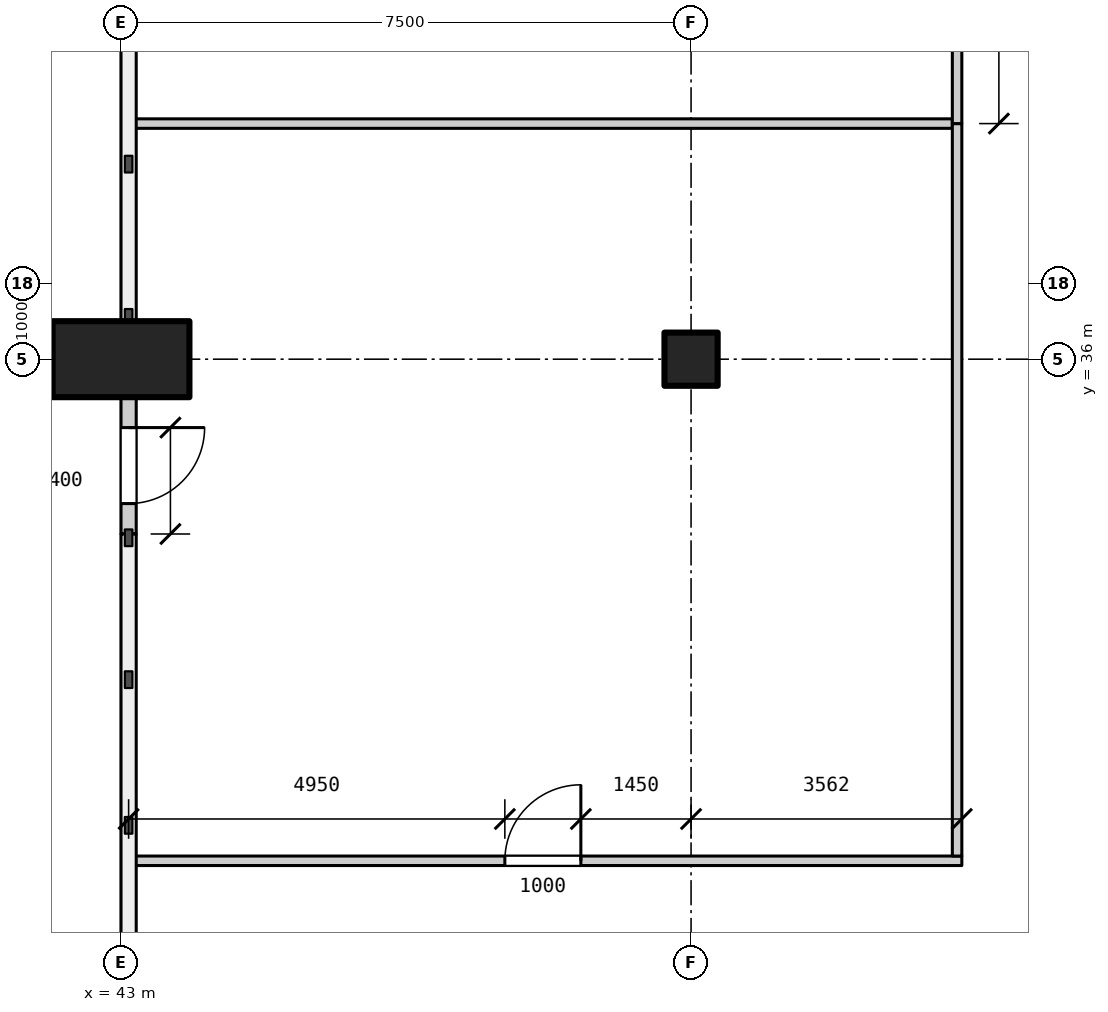
"""IFC4 building model, lengths in metres.
Left out: names, types, materials, properties, quantities, classifications, styles, units other than length and angle.
Written with IfcOpenShell. Run it as: python <this file> out.ifc"""

import sys

from ifc_helpers import new_model, si_unit, direction, frame, frame_2d, origin, origin_2d, place, context, subcontext, project, spatial, rectangle, extrude, element, fill, save


model = new_model("IFC4")
c1 = context("Model", 3, precision=1e-05, world=origin(), true_north=direction((0.0, 1.0)))
c2 = subcontext(c1, "Body", "Model", "MODEL_VIEW")
j1 = project(units=[si_unit("LENGTHUNIT", "METRE"), si_unit("PLANEANGLEUNIT", "RADIAN")], contexts=[c1])
p1 = place(None, origin())
s1 = spatial("IfcSite", under=j1, at=p1, CompositionType="ELEMENT")
p2 = place(p1, origin())
s2 = spatial("IfcBuilding", under=s1, at=p2, CompositionType="ELEMENT")
p3 = place(p2, origin())
s3 = spatial("IfcBuildingStorey", under=s2, at=p3, CompositionType="ELEMENT", Elevation=0.0)
p4 = place(p3, frame((50.5, 36.0, 0.0), z_axis=(0.0, 0.0, 1.0), x_axis=(1.0, 0.0, 0.0)))
e1 = element("IfcColumn", 1, at=p4, inside=s3, PredefinedType="COLUMN", context=c2, shape_type="SweptSolid", body=[
    extrude(rectangle(XDim=0.7, YDim=0.7, at=origin_2d()), origin(), (0.0, 0.0, 1.0), 6.0),
])
p5 = place(p3, frame((43.0, 36.0, 0.0), z_axis=(0.0, 0.0, 1.0), x_axis=(1.0, 0.0, 0.0)))
e2 = element("IfcColumn", 2, at=p5, inside=s3, PredefinedType="COLUMN", context=c2, shape_type="SweptSolid", body=[
    extrude(rectangle(XDim=1.8, YDim=1.0, at=origin_2d()), origin(), (0.0, 0.0, 1.0), 6.0),
])
p6 = place(p3, frame((43.1, 33.7, 0.0), z_axis=(0.0, 0.0, 1.0), x_axis=(0.0, 1.0, 0.0)))
e3 = element("IfcWall", 3, at=p6, inside=s3, PredefinedType="PARTITIONING", context=c2, shape_type="SweptSolid", body=[
    extrude(rectangle(XDim=1.8, YDim=0.2, at=frame_2d((0.9, 0.0))), origin(), (0.0, 0.0, 1.0), 5.8),
])
p7 = place(p6, frame((0.4, 0.0, 0.0)))
e4 = element("IfcOpeningElement", 4, at=p7, cuts=e3, PredefinedType="OPENING", context=c2, shape_type="SweptSolid", body=[
    extrude(rectangle(XDim=1.0, YDim=2.4, at=frame_2d((0.5, 1.2))), frame((0.0, 0.11, 0.0), z_axis=(0.0, -1.0, 0.0), x_axis=(1.0, 0.0, 0.0)), (0.0, 0.0, 1.0), 0.22),
])
p8 = place(p3, frame((43.1, 29.4, 0.0), z_axis=(0.0, 0.0, 1.0), x_axis=(1.0, 0.0, 0.0)))
e5 = element("IfcWall", 5, at=p8, inside=s3, PredefinedType="PARTITIONING", context=c2, shape_type="SweptSolid", body=[
    extrude(rectangle(XDim=10.962, YDim=0.125, at=frame_2d((5.481, 0.0))), origin(), (0.0, 0.0, 1.0), 5.8),
])
p9 = place(p8, frame((4.95, 0.0, 0.0)))
e6 = element("IfcOpeningElement", 6, at=p9, cuts=e5, PredefinedType="OPENING", context=c2, shape_type="SweptSolid", body=[
    extrude(rectangle(XDim=1.0, YDim=2.1, at=frame_2d((0.5, 1.05))), frame((0.0, 0.073, 0.0), z_axis=(0.0, -1.0, 0.0), x_axis=(1.0, 0.0, 0.0)), (0.0, 0.0, 1.0), 0.145),
])
p10 = place(p3, frame((43.1, 39.1, 0.0), z_axis=(0.0, 0.0, 1.0), x_axis=(1.0, 0.0, 0.0)))
e7 = element("IfcWall", 7, at=p10, inside=s3, PredefinedType="PARTITIONING", context=c2, shape_type="SweptSolid", body=[
    extrude(rectangle(XDim=10.837, YDim=0.125, at=frame_2d((5.419, 0.0))), origin(), (0.0, 0.0, 1.0), 5.8),
])
p11 = place(p3, frame((54.0, 29.462, 0.0), z_axis=(0.0, 0.0, 1.0), x_axis=(0.0, 1.0, 0.0)))
e8 = element("IfcWall", 8, at=p11, inside=s3, PredefinedType="PARTITIONING", context=c2, shape_type="SweptSolid", body=[
    extrude(rectangle(XDim=9.638, YDim=0.125, at=frame_2d((4.819, 0.0))), origin(), (0.0, 0.0, 1.0), 5.05),
])
p12 = place(p3, frame((54.0, 39.1, 0.0), z_axis=(0.0, 0.0, 1.0), x_axis=(0.0, 1.0, 0.0)))
e9 = element("IfcWall", 9, at=p12, inside=s3, PredefinedType="PARTITIONING", context=c2, shape_type="SweptSolid", body=[
    extrude(rectangle(XDim=9.0, YDim=0.125, at=frame_2d((4.5, 0.0))), origin(), (0.0, 0.0, 1.0), 5.05),
])
p13 = place(p12, frame((4.0, 0.0, 0.0)))
e10 = element("IfcOpeningElement", 10, at=p13, cuts=e9, PredefinedType="OPENING", context=c2, shape_type="SweptSolid", body=[
    extrude(rectangle(XDim=1.0, YDim=2.1, at=frame_2d((0.5, 1.05))), frame((0.0, 0.073, 0.0), z_axis=(0.0, -1.0, 0.0), x_axis=(1.0, 0.0, 0.0)), (0.0, 0.0, 1.0), 0.145),
])
p14 = place(p7, frame((1.0, 0.0, 0.0), z_axis=(0.0, 0.0, 1.0), x_axis=(-1.0, 0.0, 0.0)))
e11 = element("IfcDoor", 11, at=p14, inside=s3, OperationType="SINGLE_SWING_LEFT", PredefinedType="DOOR", context=c2, shape_type="SweptSolid", body=[
    extrude(rectangle(XDim=1.0, YDim=2.4, at=frame_2d((0.5, 1.2))), frame((0.0, 0.025, 0.0), z_axis=(0.0, -1.0, 0.0), x_axis=(1.0, 0.0, 0.0)), (0.0, 0.0, 1.0), 0.05),
])
fill(e4, e11)
p15 = place(p9, origin())
e12 = element("IfcDoor", 12, at=p15, inside=s3, OperationType="SINGLE_SWING_RIGHT", PredefinedType="DOOR", context=c2, shape_type="SweptSolid", body=[
    extrude(rectangle(XDim=1.0, YDim=2.1, at=frame_2d((0.5, 1.05))), frame((0.0, 0.025, 0.0), z_axis=(0.0, -1.0, 0.0), x_axis=(1.0, 0.0, 0.0)), (0.0, 0.0, 1.0), 0.05),
])
fill(e6, e12)
save(model, sys.argv[1])
